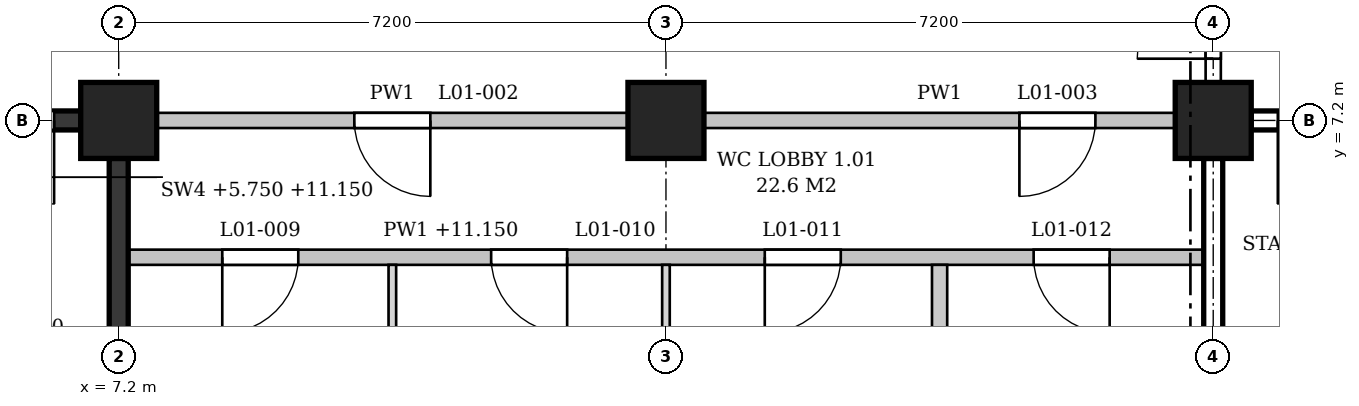
"""IFC4 building model, lengths in metres.
Left out: names, types, materials, properties, quantities, classifications, styles, units other than length and angle.
Written with IfcOpenShell. Run it as: python <this file> out.ifc"""

import sys

from ifc_helpers import new_model, si_unit, direction, frame, frame_2d, origin, origin_2d, place, context, subcontext, project, spatial, polyline, rectangle, outline, extrude, element, fill, save


model = new_model("IFC4")
c1 = context("Model", 3, precision=1e-05, world=origin(), true_north=direction((0.0, 1.0)))
c2 = subcontext(c1, "Body", "Model", "MODEL_VIEW")
j1 = project(units=[si_unit("LENGTHUNIT", "METRE"), si_unit("PLANEANGLEUNIT", "RADIAN")], contexts=[c1])
p1 = place(None, origin())
s1 = spatial("IfcSite", under=j1, at=p1, CompositionType="ELEMENT")
p2 = place(p1, origin())
s2 = spatial("IfcBuilding", under=s1, at=p2, CompositionType="ELEMENT")
p3 = place(p2, frame((0.0, 0.0, 6.0)))
s3 = spatial("IfcBuildingStorey", under=s2, at=p3, CompositionType="ELEMENT", Elevation=6.0)
for number, where, z_axis, x_axis in (
    (1, (7.2, 7.2, 0.0), (0.0, 0.0, 1.0), (1.0, 0.0, 0.0)),
    (2, (14.4, 7.2, 0.0), (0.0, 0.0, 1.0), (1.0, 0.0, 0.0)),
    (3, (21.6, 7.2, 0.0), (0.0, 0.0, 1.0), (1.0, 0.0, 0.0)),
):
    element("IfcColumn", number, at=place(p3, frame(where, z_axis=z_axis, x_axis=x_axis)), inside=s3, PredefinedType="COLUMN", context=c2, shape_type="SweptSolid", body=[
        extrude(rectangle(XDim=1.0, YDim=1.0, at=origin_2d()), origin(), (0.0, 0.0, 1.0), 5.4),
    ])
p4 = place(p3, frame((0.5, 7.2, 0.0), z_axis=(0.0, 0.0, 1.0), x_axis=(1.0, 0.0, 0.0)))
e4 = element("IfcWall", 4, at=p4, inside=s3, PredefinedType="SHEAR", context=c2, shape_type="SweptSolid", body=[
    extrude(rectangle(XDim=6.2, YDim=0.25, at=frame_2d((3.1, 0.0))), origin(), (0.0, 0.0, 1.0), 4.4),
])
p5 = place(p4, frame((4.75, 0.0, 0.0)))
e5 = element("IfcOpeningElement", 5, at=p5, cuts=e4, PredefinedType="OPENING", context=c2, shape_type="SweptSolid", body=[
    extrude(rectangle(XDim=1.1, YDim=2.1, at=frame_2d((0.55, 1.05))), frame((0.0, 0.135, 0.0), z_axis=(0.0, -1.0, 0.0), x_axis=(1.0, 0.0, 0.0)), (0.0, 0.0, 1.0), 0.27),
])
p6 = place(p3, frame((7.2, 0.5, 0.0), z_axis=(0.0, 0.0, 1.0), x_axis=(0.0, 1.0, 0.0)))
e6 = element("IfcWall", 6, at=p6, inside=s3, PredefinedType="SHEAR", context=c2, shape_type="SweptSolid", body=[
    extrude(rectangle(XDim=6.2, YDim=0.25, at=frame_2d((3.1, 0.0))), origin(), (0.0, 0.0, 1.0), 4.4),
])
p7 = place(p3, frame((22.1, 7.2, 0.0), z_axis=(0.0, 0.0, 1.0), x_axis=(1.0, 0.0, 0.0)))
e7 = element("IfcWall", 7, at=p7, inside=s3, PredefinedType="SHEAR", context=c2, shape_type="SweptSolid", body=[
    extrude(rectangle(XDim=6.2, YDim=0.25, at=frame_2d((3.1, 0.0))), origin(), (0.0, 0.0, 1.0), 4.4),
])
p8 = place(p7, frame((0.35, 0.0, 0.0)))
e8 = element("IfcOpeningElement", 8, at=p8, cuts=e7, PredefinedType="OPENING", context=c2, shape_type="SweptSolid", body=[
    extrude(rectangle(XDim=1.1, YDim=2.1, at=frame_2d((0.55, 1.05))), frame((0.0, 0.135, 0.0), z_axis=(0.0, -1.0, 0.0), x_axis=(1.0, 0.0, 0.0)), (0.0, 0.0, 1.0), 0.27),
])
p9 = place(p3, frame((21.6, 0.5, 0.0), z_axis=(0.0, 0.0, 1.0), x_axis=(0.0, 1.0, 0.0)))
e9 = element("IfcWall", 9, at=p9, inside=s3, PredefinedType="SHEAR", context=c2, shape_type="SweptSolid", body=[
    extrude(rectangle(XDim=6.2, YDim=0.25, at=frame_2d((3.1, 0.0))), origin(), (0.0, 0.0, 1.0), 4.4),
])
p10 = place(p3, frame((7.325, 5.4, 0.0), z_axis=(0.0, 0.0, 1.0), x_axis=(1.0, 0.0, 0.0)))
e10 = element("IfcWall", 10, at=p10, inside=s3, PredefinedType="PARTITIONING", context=c2, shape_type="SweptSolid", body=[
    extrude(outline(polyline([(0.0, 0.0), (14.15, 0.0), (14.15, 4.4), (14.025, 4.4), (14.025, 5.15), (7.325, 5.15), (7.325, 4.4), (6.825, 4.4), (6.825, 5.15), (0.125, 5.15), (0.125, 4.4), (0.0, 4.4), (0.0, 0.0)])), frame((0.0, 0.1, 0.0), z_axis=(0.0, -1.0, 0.0), x_axis=(1.0, 0.0, 0.0)), (0.0, 0.0, 1.0), 0.2),
])
p11 = place(p10, frame((1.238, 0.0, 0.0)))
e11 = element("IfcOpeningElement", 11, at=p11, cuts=e10, PredefinedType="OPENING", context=c2, shape_type="SweptSolid", body=[
    extrude(rectangle(XDim=1.0, YDim=2.1, at=frame_2d((0.5, 1.05))), frame((0.0, 0.11, 0.0), z_axis=(0.0, -1.0, 0.0), x_axis=(1.0, 0.0, 0.0)), (0.0, 0.0, 1.0), 0.22),
])
p12 = place(p10, frame((4.775, 0.0, 0.0)))
e12 = element("IfcOpeningElement", 12, at=p12, cuts=e10, PredefinedType="OPENING", context=c2, shape_type="SweptSolid", body=[
    extrude(rectangle(XDim=1.0, YDim=2.1, at=frame_2d((0.5, 1.05))), frame((0.0, 0.11, 0.0), z_axis=(0.0, -1.0, 0.0), x_axis=(1.0, 0.0, 0.0)), (0.0, 0.0, 1.0), 0.22),
])
p13 = place(p10, frame((8.375, 0.0, 0.0)))
e13 = element("IfcOpeningElement", 13, at=p13, cuts=e10, PredefinedType="OPENING", context=c2, shape_type="SweptSolid", body=[
    extrude(rectangle(XDim=1.0, YDim=2.1, at=frame_2d((0.5, 1.05))), frame((0.0, 0.11, 0.0), z_axis=(0.0, -1.0, 0.0), x_axis=(1.0, 0.0, 0.0)), (0.0, 0.0, 1.0), 0.22),
])
p14 = place(p10, frame((11.913, 0.0, 0.0)))
e14 = element("IfcOpeningElement", 14, at=p14, cuts=e10, PredefinedType="OPENING", context=c2, shape_type="SweptSolid", body=[
    extrude(rectangle(XDim=1.0, YDim=2.1, at=frame_2d((0.5, 1.05))), frame((0.0, 0.11, 0.0), z_axis=(0.0, -1.0, 0.0), x_axis=(1.0, 0.0, 0.0)), (0.0, 0.0, 1.0), 0.22),
])
p15 = place(p3, frame((7.7, 7.2, 0.0), z_axis=(0.0, 0.0, 1.0), x_axis=(1.0, 0.0, 0.0)))
e15 = element("IfcWall", 15, at=p15, inside=s3, PredefinedType="PARTITIONING", context=c2, shape_type="SweptSolid", body=[
    extrude(rectangle(XDim=6.2, YDim=0.2, at=frame_2d((3.1, 0.0))), origin(), (0.0, 0.0, 1.0), 4.4),
])
p16 = place(p15, frame((2.6, 0.0, 0.0)))
e16 = element("IfcOpeningElement", 16, at=p16, cuts=e15, PredefinedType="OPENING", context=c2, shape_type="SweptSolid", body=[
    extrude(rectangle(XDim=1.0, YDim=2.1, at=frame_2d((0.5, 1.05))), frame((0.0, 0.11, 0.0), z_axis=(0.0, -1.0, 0.0), x_axis=(1.0, 0.0, 0.0)), (0.0, 0.0, 1.0), 0.22),
])
p17 = place(p3, frame((14.9, 7.2, 0.0), z_axis=(0.0, 0.0, 1.0), x_axis=(1.0, 0.0, 0.0)))
e17 = element("IfcWall", 17, at=p17, inside=s3, PredefinedType="PARTITIONING", context=c2, shape_type="SweptSolid", body=[
    extrude(rectangle(XDim=6.2, YDim=0.2, at=frame_2d((3.1, 0.0))), origin(), (0.0, 0.0, 1.0), 4.4),
])
p18 = place(p17, frame((4.15, 0.0, 0.0)))
e18 = element("IfcOpeningElement", 18, at=p18, cuts=e17, PredefinedType="OPENING", context=c2, shape_type="SweptSolid", body=[
    extrude(rectangle(XDim=1.0, YDim=2.1, at=frame_2d((0.5, 1.05))), frame((0.0, 0.11, 0.0), z_axis=(0.0, -1.0, 0.0), x_axis=(1.0, 0.0, 0.0)), (0.0, 0.0, 1.0), 0.22),
])
p19 = place(p3, frame((10.8, 0.15, 0.0), z_axis=(0.0, 0.0, 1.0), x_axis=(0.0, 1.0, 0.0)))
e19 = element("IfcWall", 19, at=p19, inside=s3, PredefinedType="PARTITIONING", context=c2, shape_type="SweptSolid", body=[
    extrude(rectangle(XDim=5.15, YDim=0.1, at=frame_2d((2.575, 0.0))), origin(), (0.0, 0.0, 1.0), 4.4),
])
p20 = place(p3, frame((14.4, 0.5, 0.0), z_axis=(0.0, 0.0, 1.0), x_axis=(0.0, 1.0, 0.0)))
e20 = element("IfcWall", 20, at=p20, inside=s3, PredefinedType="PARTITIONING", context=c2, shape_type="SweptSolid", body=[
    extrude(rectangle(XDim=4.8, YDim=0.1, at=frame_2d((2.4, 0.0))), origin(), (0.0, 0.0, 1.0), 4.4),
])
p21 = place(p3, frame((18.0, 0.15, 0.0), z_axis=(0.0, 0.0, 1.0), x_axis=(0.0, 1.0, 0.0)))
e21 = element("IfcWall", 21, at=p21, inside=s3, PredefinedType="PARTITIONING", context=c2, shape_type="SweptSolid", body=[
    extrude(outline(polyline([(0.0, 0.0), (5.15, 0.0), (5.15, 5.15), (0.1, 5.15), (0.1, 4.55), (0.0, 4.55), (0.0, 0.0)])), frame((0.0, 0.1, 0.0), z_axis=(0.0, -1.0, 0.0), x_axis=(1.0, 0.0, 0.0)), (0.0, 0.0, 1.0), 0.2),
])
p22 = place(p3, frame((21.6, 7.7, 0.0), z_axis=(0.0, 0.0, 1.0), x_axis=(0.0, 1.0, 0.0)))
e22 = element("IfcWall", 22, at=p22, inside=s3, PredefinedType="PARTITIONING", context=c2, shape_type="SweptSolid", body=[
    extrude(rectangle(XDim=2.625, YDim=0.2, at=frame_2d((1.312, 0.0))), origin(), (0.0, 0.0, 1.0), 4.4),
])
p23 = place(p22, frame((0.312, 0.0, 0.0)))
e23 = element("IfcOpeningElement", 23, at=p23, cuts=e22, PredefinedType="OPENING", context=c2, shape_type="SweptSolid", body=[
    extrude(rectangle(XDim=2.0, YDim=2.4, at=frame_2d((1.0, 1.2))), frame((0.0, 0.11, 0.0), z_axis=(0.0, -1.0, 0.0), x_axis=(1.0, 0.0, 0.0)), (0.0, 0.0, 1.0), 0.22),
])
p24 = place(p5, frame((1.1, 0.0, 0.0), z_axis=(0.0, 0.0, 1.0), x_axis=(-1.0, 0.0, 0.0)))
e24 = element("IfcDoor", 24, at=p24, inside=s3, OperationType="SINGLE_SWING_LEFT", PredefinedType="DOOR", context=c2, shape_type="SweptSolid", body=[
    extrude(rectangle(XDim=1.1, YDim=2.1, at=frame_2d((0.55, 1.05))), frame((0.0, 0.025, 0.0), z_axis=(0.0, -1.0, 0.0), x_axis=(1.0, 0.0, 0.0)), (0.0, 0.0, 1.0), 0.05),
])
fill(e5, e24)
p25 = place(p8, frame((1.1, 0.0, 0.0), z_axis=(0.0, 0.0, 1.0), x_axis=(-1.0, 0.0, 0.0)))
e25 = element("IfcDoor", 25, at=p25, inside=s3, OperationType="SINGLE_SWING_RIGHT", PredefinedType="DOOR", context=c2, shape_type="SweptSolid", body=[
    extrude(rectangle(XDim=1.1, YDim=2.1, at=frame_2d((0.55, 1.05))), frame((0.0, 0.025, 0.0), z_axis=(0.0, -1.0, 0.0), x_axis=(1.0, 0.0, 0.0)), (0.0, 0.0, 1.0), 0.05),
])
fill(e8, e25)
p26 = place(p23, origin())
e26 = element("IfcDoor", 26, at=p26, inside=s3, OperationType="DOUBLE_DOOR_SINGLE_SWING", PredefinedType="DOOR", context=c2, shape_type="SweptSolid", body=[
    extrude(rectangle(XDim=2.0, YDim=2.4, at=frame_2d((1.0, 1.2))), frame((0.0, 0.025, 0.0), z_axis=(0.0, -1.0, 0.0), x_axis=(1.0, 0.0, 0.0)), (0.0, 0.0, 1.0), 0.05),
])
fill(e23, e26)
p27 = place(p16, frame((1.0, 0.0, 0.0), z_axis=(0.0, 0.0, 1.0), x_axis=(-1.0, 0.0, 0.0)))
e27 = element("IfcDoor", 27, at=p27, inside=s3, OperationType="SINGLE_SWING_LEFT", PredefinedType="DOOR", context=c2, shape_type="SweptSolid", body=[
    extrude(rectangle(XDim=1.0, YDim=2.1, at=frame_2d((0.5, 1.05))), frame((0.0, 0.025, 0.0), z_axis=(0.0, -1.0, 0.0), x_axis=(1.0, 0.0, 0.0)), (0.0, 0.0, 1.0), 0.05),
])
fill(e16, e27)
p28 = place(p18, frame((1.0, 0.0, 0.0), z_axis=(0.0, 0.0, 1.0), x_axis=(-1.0, 0.0, 0.0)))
e28 = element("IfcDoor", 28, at=p28, inside=s3, OperationType="SINGLE_SWING_RIGHT", PredefinedType="DOOR", context=c2, shape_type="SweptSolid", body=[
    extrude(rectangle(XDim=1.0, YDim=2.1, at=frame_2d((0.5, 1.05))), frame((0.0, 0.025, 0.0), z_axis=(0.0, -1.0, 0.0), x_axis=(1.0, 0.0, 0.0)), (0.0, 0.0, 1.0), 0.05),
])
fill(e18, e28)
p29 = place(p11, frame((1.0, 0.0, 0.0), z_axis=(0.0, 0.0, 1.0), x_axis=(-1.0, 0.0, 0.0)))
e29 = element("IfcDoor", 29, at=p29, inside=s3, OperationType="SINGLE_SWING_RIGHT", PredefinedType="DOOR", context=c2, shape_type="SweptSolid", body=[
    extrude(rectangle(XDim=1.0, YDim=2.1, at=frame_2d((0.5, 1.05))), frame((0.0, 0.025, 0.0), z_axis=(0.0, -1.0, 0.0), x_axis=(1.0, 0.0, 0.0)), (0.0, 0.0, 1.0), 0.05),
])
fill(e11, e29)
p30 = place(p12, frame((1.0, 0.0, 0.0), z_axis=(0.0, 0.0, 1.0), x_axis=(-1.0, 0.0, 0.0)))
e30 = element("IfcDoor", 30, at=p30, inside=s3, OperationType="SINGLE_SWING_LEFT", PredefinedType="DOOR", context=c2, shape_type="SweptSolid", body=[
    extrude(rectangle(XDim=1.0, YDim=2.1, at=frame_2d((0.5, 1.05))), frame((0.0, 0.025, 0.0), z_axis=(0.0, -1.0, 0.0), x_axis=(1.0, 0.0, 0.0)), (0.0, 0.0, 1.0), 0.05),
])
fill(e12, e30)
p31 = place(p13, frame((1.0, 0.0, 0.0), z_axis=(0.0, 0.0, 1.0), x_axis=(-1.0, 0.0, 0.0)))
e31 = element("IfcDoor", 31, at=p31, inside=s3, OperationType="SINGLE_SWING_RIGHT", PredefinedType="DOOR", context=c2, shape_type="SweptSolid", body=[
    extrude(rectangle(XDim=1.0, YDim=2.1, at=frame_2d((0.5, 1.05))), frame((0.0, 0.025, 0.0), z_axis=(0.0, -1.0, 0.0), x_axis=(1.0, 0.0, 0.0)), (0.0, 0.0, 1.0), 0.05),
])
fill(e13, e31)
p32 = place(p14, frame((1.0, 0.0, 0.0), z_axis=(0.0, 0.0, 1.0), x_axis=(-1.0, 0.0, 0.0)))
e32 = element("IfcDoor", 32, at=p32, inside=s3, OperationType="SINGLE_SWING_LEFT", PredefinedType="DOOR", context=c2, shape_type="SweptSolid", body=[
    extrude(rectangle(XDim=1.0, YDim=2.1, at=frame_2d((0.5, 1.05))), frame((0.0, 0.025, 0.0), z_axis=(0.0, -1.0, 0.0), x_axis=(1.0, 0.0, 0.0)), (0.0, 0.0, 1.0), 0.05),
])
fill(e14, e32)
save(model, sys.argv[1])
